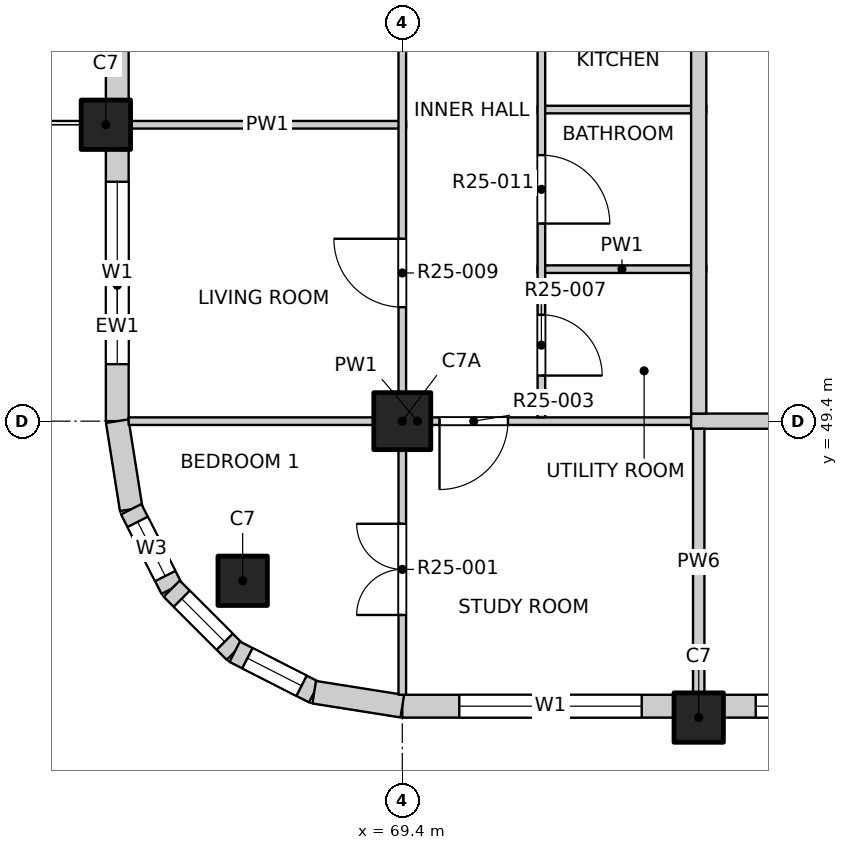
"""IFC4 building model, lengths in metres.
Left out: names, types, materials, properties, quantities, classifications, styles, units other than length and angle.
Written with IfcOpenShell. Run it as: python <this file> out.ifc"""

import sys

from ifc_helpers import new_model, si_unit, direction, frame, frame_2d, origin, origin_2d, place, context, subcontext, project, spatial, rectangle, extrude, element, fill, save


model = new_model("IFC4")
c1 = context("Model", 3, precision=1e-05, world=origin(), true_north=direction((0.0, 1.0)))
c2 = subcontext(c1, "Body", "Model", "MODEL_VIEW")
j1 = project(units=[si_unit("LENGTHUNIT", "METRE"), si_unit("PLANEANGLEUNIT", "RADIAN")], contexts=[c1])
p1 = place(None, origin())
s1 = spatial("IfcSite", under=j1, at=p1, CompositionType="ELEMENT")
p2 = place(p1, origin())
s2 = spatial("IfcBuilding", under=s1, at=p2, CompositionType="ELEMENT")
p3 = place(p2, frame((0.0, 0.0, 252.8)))
s3 = spatial("IfcBuildingStorey", under=s2, at=p3, CompositionType="ELEMENT", Elevation=252.8)
for number, where, z_axis, x_axis in (
    (1, (67.3, 47.3, -0.25), (0.0, 0.0, 1.0), (1.0, 0.0, 0.0)),
    (2, (65.5, 53.3, -0.25), (0.0, 0.0, 1.0), (1.0, 0.0, 0.0)),
    (3, (73.3, 45.5, -0.25), (0.0, 0.0, 1.0), (1.0, 0.0, 0.0)),
):
    element("IfcColumn", number, at=place(p3, frame(where, z_axis=z_axis, x_axis=x_axis)), inside=s3, PredefinedType="COLUMN", context=c2, shape_type="SweptSolid", body=[
        extrude(rectangle(XDim=0.65, YDim=0.65, at=origin_2d()), origin(), (0.0, 0.0, 1.0), 3.4),
    ])
p4 = place(p3, frame((69.4, 49.4, -0.25), z_axis=(0.0, 0.0, 1.0), x_axis=(1.0, 0.0, 0.0)))
e4 = element("IfcColumn", 4, at=p4, inside=s3, PredefinedType="COLUMN", context=c2, shape_type="SweptSolid", body=[
    extrude(rectangle(XDim=0.75, YDim=0.75, at=origin_2d()), origin(), (0.0, 0.0, 1.0), 3.4),
])
p5 = place(p3, frame((69.4, 45.65, 0.0), z_axis=(0.0, 0.0, 1.0), x_axis=(1.0, 0.0, 0.0)))
e5 = element("IfcWall", 5, at=p5, inside=s3, PredefinedType="SOLIDWALL", context=c2, shape_type="SweptSolid", body=[
    extrude(rectangle(XDim=3.575, YDim=0.3, at=frame_2d((1.788, 0.0))), origin(), (0.0, 0.0, 1.0), 2.7),
])
p6 = place(p5, frame((0.75, 0.0, 0.9)))
e6 = element("IfcOpeningElement", 6, at=p6, cuts=e5, PredefinedType="OPENING", context=c2, shape_type="SweptSolid", body=[
    extrude(rectangle(XDim=2.4, YDim=1.8, at=frame_2d((1.2, 0.9))), frame((0.0, 0.16, 0.0), z_axis=(0.0, -1.0, 0.0), x_axis=(1.0, 0.0, 0.0)), (0.0, 0.0, 1.0), 0.32),
])
p7 = place(p3, frame((73.625, 45.65, 0.0), z_axis=(0.0, 0.0, 1.0), x_axis=(1.0, 0.0, 0.0)))
e7 = element("IfcWall", 7, at=p7, inside=s3, PredefinedType="SOLIDWALL", context=c2, shape_type="SweptSolid", body=[
    extrude(rectangle(XDim=7.15, YDim=0.3, at=frame_2d((3.575, 0.0))), origin(), (0.0, 0.0, 1.0), 2.7),
])
p8 = place(p7, frame((0.425, 0.0, 0.9)))
e8 = element("IfcOpeningElement", 8, at=p8, cuts=e7, PredefinedType="OPENING", context=c2, shape_type="SweptSolid", body=[
    extrude(rectangle(XDim=2.4, YDim=1.8, at=frame_2d((1.2, 0.9))), frame((0.0, 0.16, 0.0), z_axis=(0.0, -1.0, 0.0), x_axis=(1.0, 0.0, 0.0)), (0.0, 0.0, 1.0), 0.32),
])
p9 = place(p7, frame((4.325, 0.0, 0.9)))
e9 = element("IfcOpeningElement", 9, at=p9, cuts=e7, PredefinedType="OPENING", context=c2, shape_type="SweptSolid", body=[
    extrude(rectangle(XDim=2.4, YDim=1.8, at=frame_2d((1.2, 0.9))), frame((0.0, 0.16, 0.0), z_axis=(0.0, -1.0, 0.0), x_axis=(1.0, 0.0, 0.0)), (0.0, 0.0, 1.0), 0.32),
])
p10 = place(p3, frame((65.65, 49.4, 0.0), z_axis=(0.0, 0.0, 1.0), x_axis=(0.0, 1.0, 0.0)))
e10 = element("IfcWall", 10, at=p10, inside=s3, PredefinedType="SOLIDWALL", context=c2, shape_type="SweptSolid", body=[
    extrude(rectangle(XDim=3.575, YDim=0.3, at=frame_2d((1.788, 0.0))), origin(), (0.0, 0.0, 1.0), 2.7),
])
p11 = place(p10, frame((0.75, 0.0, 0.9)))
e11 = element("IfcOpeningElement", 11, at=p11, cuts=e10, PredefinedType="OPENING", context=c2, shape_type="SweptSolid", body=[
    extrude(rectangle(XDim=2.4, YDim=1.8, at=frame_2d((1.2, 0.9))), frame((0.0, 0.16, 0.0), z_axis=(0.0, -1.0, 0.0), x_axis=(1.0, 0.0, 0.0)), (0.0, 0.0, 1.0), 0.32),
])
p12 = place(p3, frame((65.65, 53.625, 0.0), z_axis=(0.0, 0.0, 1.0), x_axis=(0.0, 1.0, 0.0)))
e12 = element("IfcWall", 12, at=p12, inside=s3, PredefinedType="SOLIDWALL", context=c2, shape_type="SweptSolid", body=[
    extrude(rectangle(XDim=7.15, YDim=0.3, at=frame_2d((3.575, 0.0))), origin(), (0.0, 0.0, 1.0), 2.7),
])
p13 = place(p12, frame((0.725, 0.0, 0.0)))
e13 = element("IfcOpeningElement", 13, at=p13, cuts=e12, PredefinedType="OPENING", context=c2, shape_type="SweptSolid", body=[
    extrude(rectangle(XDim=1.8, YDim=2.4, at=frame_2d((0.9, 1.2))), frame((0.0, 0.16, 0.0), z_axis=(0.0, -1.0, 0.0), x_axis=(1.0, 0.0, 0.0)), (0.0, 0.0, 1.0), 0.32),
])
p14 = place(p12, frame((4.325, 0.0, 0.9)))
e14 = element("IfcOpeningElement", 14, at=p14, cuts=e12, PredefinedType="OPENING", context=c2, shape_type="SweptSolid", body=[
    extrude(rectangle(XDim=2.4, YDim=1.8, at=frame_2d((1.2, 0.9))), frame((0.0, 0.16, 0.0), z_axis=(0.0, -1.0, 0.0), x_axis=(1.0, 0.0, 0.0)), (0.0, 0.0, 1.0), 0.32),
])
p15 = place(p3, frame((65.65, 49.4, 0.0), z_axis=(0.0, 0.0, 1.0), x_axis=(0.156496880861, -0.987678452879, 0.0)))
e15 = element("IfcWall", 15, at=p15, inside=s3, PredefinedType="SOLIDWALL", context=c2, shape_type="SweptSolid", body=[
    extrude(rectangle(XDim=1.173, YDim=0.3, at=frame_2d((0.586, 0.0))), origin(), (0.0, 0.0, 1.0), 2.7),
])
p16 = place(p3, frame((65.833, 48.241, 0.0), z_axis=(0.0, 0.0, 1.0), x_axis=(0.454025524128, -0.890988677504, 0.0)))
e16 = element("IfcWall", 16, at=p16, inside=s3, PredefinedType="SOLIDWALL", context=c2, shape_type="SweptSolid", body=[
    extrude(rectangle(XDim=1.173, YDim=0.3, at=frame_2d((0.587, 0.0))), origin(), (0.0, 0.0, 1.0), 2.7),
])
p17 = place(p16, frame((0.187, 0.0, 0.9)))
e17 = element("IfcOpeningElement", 17, at=p17, cuts=e16, PredefinedType="OPENING", context=c2, shape_type="SweptSolid", body=[
    extrude(rectangle(XDim=0.8, YDim=1.2, at=frame_2d((0.4, 0.6))), frame((0.0, 0.16, 0.0), z_axis=(0.0, -1.0, 0.0), x_axis=(1.0, 0.0, 0.0)), (0.0, 0.0, 1.0), 0.32),
])
p18 = place(p3, frame((66.366, 47.196, 0.0), z_axis=(0.0, 0.0, 1.0), x_axis=(0.707106781187, -0.707106781187, 0.0)))
e18 = element("IfcWall", 18, at=p18, inside=s3, PredefinedType="SOLIDWALL", context=c2, shape_type="SweptSolid", body=[
    extrude(rectangle(XDim=1.173, YDim=0.3, at=frame_2d((0.586, 0.0))), origin(), (0.0, 0.0, 1.0), 2.7),
])
p19 = place(p18, frame((0.187, 0.0, 0.9)))
e19 = element("IfcOpeningElement", 19, at=p19, cuts=e18, PredefinedType="OPENING", context=c2, shape_type="SweptSolid", body=[
    extrude(rectangle(XDim=0.8, YDim=1.2, at=frame_2d((0.4, 0.6))), frame((0.0, 0.16, 0.0), z_axis=(0.0, -1.0, 0.0), x_axis=(1.0, 0.0, 0.0)), (0.0, 0.0, 1.0), 0.32),
])
p20 = place(p3, frame((67.196, 46.366, 0.0), z_axis=(0.0, 0.0, 1.0), x_axis=(0.890988677504, -0.454025524128, 0.0)))
e20 = element("IfcWall", 20, at=p20, inside=s3, PredefinedType="SOLIDWALL", context=c2, shape_type="SweptSolid", body=[
    extrude(rectangle(XDim=1.173, YDim=0.3, at=frame_2d((0.587, 0.0))), origin(), (0.0, 0.0, 1.0), 2.7),
])
p21 = place(p20, frame((0.187, 0.0, 0.9)))
e21 = element("IfcOpeningElement", 21, at=p21, cuts=e20, PredefinedType="OPENING", context=c2, shape_type="SweptSolid", body=[
    extrude(rectangle(XDim=0.8, YDim=1.2, at=frame_2d((0.4, 0.6))), frame((0.0, 0.16, 0.0), z_axis=(0.0, -1.0, 0.0), x_axis=(1.0, 0.0, 0.0)), (0.0, 0.0, 1.0), 0.32),
])
p22 = place(p3, frame((68.241, 45.833, 0.0), z_axis=(0.0, 0.0, 1.0), x_axis=(0.987678452879, -0.156496880861, 0.0)))
e22 = element("IfcWall", 22, at=p22, inside=s3, PredefinedType="SOLIDWALL", context=c2, shape_type="SweptSolid", body=[
    extrude(rectangle(XDim=1.173, YDim=0.3, at=frame_2d((0.586, 0.0))), origin(), (0.0, 0.0, 1.0), 2.7),
])
p23 = place(p3, frame((65.8, 49.4, 0.0), z_axis=(0.0, 0.0, 1.0), x_axis=(1.0, 0.0, 0.0)))
e23 = element("IfcWall", 23, at=p23, inside=s3, PredefinedType="PARTITIONING", context=c2, shape_type="SweptSolid", body=[
    extrude(rectangle(XDim=7.6, YDim=0.1, at=frame_2d((3.8, 0.0))), origin(), (0.0, 0.0, 1.0), 3.15),
])
p24 = place(p23, frame((4.09, 0.0, 0.0)))
e24 = element("IfcOpeningElement", 24, at=p24, cuts=e23, PredefinedType="OPENING", context=c2, shape_type="SweptSolid", body=[
    extrude(rectangle(XDim=0.9, YDim=2.1, at=frame_2d((0.45, 1.05))), frame((0.0, 0.06, 0.0), z_axis=(0.0, -1.0, 0.0), x_axis=(1.0, 0.0, 0.0)), (0.0, 0.0, 1.0), 0.12),
])
p25 = place(p3, frame((73.2, 49.4, 0.0), z_axis=(0.0, 0.0, 1.0), x_axis=(1.0, 0.0, 0.0)))
e25 = element("IfcWall", 25, at=p25, inside=s3, PredefinedType="PARTITIONING", context=c2, shape_type="SweptSolid", body=[
    extrude(rectangle(XDim=23.6, YDim=0.2, at=frame_2d((11.8, 0.0))), origin(), (0.0, 0.0, 1.0), 3.15),
])
p26 = place(p25, frame((2.325, 0.0, 0.0)))
e26 = element("IfcOpeningElement", 26, at=p26, cuts=e25, PredefinedType="OPENING", context=c2, shape_type="SweptSolid", body=[
    extrude(rectangle(XDim=1.2, YDim=2.1, at=frame_2d((0.6, 1.05))), frame((0.0, 0.11, 0.0), z_axis=(0.0, -1.0, 0.0), x_axis=(1.0, 0.0, 0.0)), (0.0, 0.0, 1.0), 0.22),
])
p27 = place(p25, frame((15.1, 0.0, 0.0)))
e27 = element("IfcOpeningElement", 27, at=p27, cuts=e25, PredefinedType="OPENING", context=c2, shape_type="SweptSolid", body=[
    extrude(rectangle(XDim=1.2, YDim=2.1, at=frame_2d((0.6, 1.05))), frame((0.0, 0.11, 0.0), z_axis=(0.0, -1.0, 0.0), x_axis=(1.0, 0.0, 0.0)), (0.0, 0.0, 1.0), 0.22),
])
p28 = place(p3, frame((71.18, 51.4, 0.0), z_axis=(0.0, 0.0, 1.0), x_axis=(1.0, 0.0, 0.0)))
e28 = element("IfcWall", 28, at=p28, inside=s3, PredefinedType="PARTITIONING", context=c2, shape_type="SweptSolid", body=[
    extrude(rectangle(XDim=2.22, YDim=0.1, at=frame_2d((1.11, 0.0))), origin(), (0.0, 0.0, 1.0), 3.15),
])
p29 = place(p3, frame((65.8, 53.3, 0.0), z_axis=(0.0, 0.0, 1.0), x_axis=(1.0, 0.0, 0.0)))
e29 = element("IfcWall", 29, at=p29, inside=s3, PredefinedType="PARTITIONING", context=c2, shape_type="SweptSolid", body=[
    extrude(rectangle(XDim=3.65, YDim=0.1, at=frame_2d((1.825, 0.0))), origin(), (0.0, 0.0, 1.0), 3.15),
])
p30 = place(p3, frame((71.18, 53.5, 0.0), z_axis=(0.0, 0.0, 1.0), x_axis=(1.0, 0.0, 0.0)))
e30 = element("IfcWall", 30, at=p30, inside=s3, PredefinedType="PARTITIONING", context=c2, shape_type="SweptSolid", body=[
    extrude(rectangle(XDim=2.22, YDim=0.1, at=frame_2d((1.11, 0.0))), origin(), (0.0, 0.0, 1.0), 3.15),
])
p31 = place(p3, frame((69.4, 45.8, 0.0), z_axis=(0.0, 0.0, 1.0), x_axis=(0.0, 1.0, 0.0)))
e31 = element("IfcWall", 31, at=p31, inside=s3, PredefinedType="PARTITIONING", context=c2, shape_type="SweptSolid", body=[
    extrude(rectangle(XDim=38.4, YDim=0.1, at=frame_2d((19.2, 0.0))), origin(), (0.0, 0.0, 1.0), 3.15),
])
p32 = place(p31, frame((1.05, 0.0, 0.0)))
e32 = element("IfcOpeningElement", 32, at=p32, cuts=e31, PredefinedType="OPENING", context=c2, shape_type="SweptSolid", body=[
    extrude(rectangle(XDim=1.2, YDim=2.1, at=frame_2d((0.6, 1.05))), frame((0.0, 0.06, 0.0), z_axis=(0.0, -1.0, 0.0), x_axis=(1.0, 0.0, 0.0)), (0.0, 0.0, 1.0), 0.12),
])
p33 = place(p31, frame((5.1, 0.0, 0.0)))
e33 = element("IfcOpeningElement", 33, at=p33, cuts=e31, PredefinedType="OPENING", context=c2, shape_type="SweptSolid", body=[
    extrude(rectangle(XDim=0.9, YDim=2.1, at=frame_2d((0.45, 1.05))), frame((0.0, 0.06, 0.0), z_axis=(0.0, -1.0, 0.0), x_axis=(1.0, 0.0, 0.0)), (0.0, 0.0, 1.0), 0.12),
])
p34 = place(p31, frame((9.0, 0.0, 0.0)))
e34 = element("IfcOpeningElement", 34, at=p34, cuts=e31, PredefinedType="OPENING", context=c2, shape_type="SweptSolid", body=[
    extrude(rectangle(XDim=0.9, YDim=2.1, at=frame_2d((0.45, 1.05))), frame((0.0, 0.06, 0.0), z_axis=(0.0, -1.0, 0.0), x_axis=(1.0, 0.0, 0.0)), (0.0, 0.0, 1.0), 0.12),
])
p35 = place(p31, frame((12.9, 0.0, 0.0)))
e35 = element("IfcOpeningElement", 35, at=p35, cuts=e31, PredefinedType="OPENING", context=c2, shape_type="SweptSolid", body=[
    extrude(rectangle(XDim=0.9, YDim=2.1, at=frame_2d((0.45, 1.05))), frame((0.0, 0.06, 0.0), z_axis=(0.0, -1.0, 0.0), x_axis=(1.0, 0.0, 0.0)), (0.0, 0.0, 1.0), 0.12),
])
p36 = place(p31, frame((16.8, 0.0, 0.0)))
e36 = element("IfcOpeningElement", 36, at=p36, cuts=e31, PredefinedType="OPENING", context=c2, shape_type="SweptSolid", body=[
    extrude(rectangle(XDim=0.9, YDim=2.1, at=frame_2d((0.45, 1.05))), frame((0.0, 0.06, 0.0), z_axis=(0.0, -1.0, 0.0), x_axis=(1.0, 0.0, 0.0)), (0.0, 0.0, 1.0), 0.12),
])
p37 = place(p31, frame((20.7, 0.0, 0.0)))
e37 = element("IfcOpeningElement", 37, at=p37, cuts=e31, PredefinedType="OPENING", context=c2, shape_type="SweptSolid", body=[
    extrude(rectangle(XDim=0.9, YDim=2.1, at=frame_2d((0.45, 1.05))), frame((0.0, 0.06, 0.0), z_axis=(0.0, -1.0, 0.0), x_axis=(1.0, 0.0, 0.0)), (0.0, 0.0, 1.0), 0.12),
])
p38 = place(p31, frame((24.6, 0.0, 0.0)))
e38 = element("IfcOpeningElement", 38, at=p38, cuts=e31, PredefinedType="OPENING", context=c2, shape_type="SweptSolid", body=[
    extrude(rectangle(XDim=0.9, YDim=2.1, at=frame_2d((0.45, 1.05))), frame((0.0, 0.06, 0.0), z_axis=(0.0, -1.0, 0.0), x_axis=(1.0, 0.0, 0.0)), (0.0, 0.0, 1.0), 0.12),
])
p39 = place(p31, frame((28.5, 0.0, 0.0)))
e39 = element("IfcOpeningElement", 39, at=p39, cuts=e31, PredefinedType="OPENING", context=c2, shape_type="SweptSolid", body=[
    extrude(rectangle(XDim=0.9, YDim=2.1, at=frame_2d((0.45, 1.05))), frame((0.0, 0.06, 0.0), z_axis=(0.0, -1.0, 0.0), x_axis=(1.0, 0.0, 0.0)), (0.0, 0.0, 1.0), 0.12),
])
p40 = place(p31, frame((32.4, 0.0, 0.0)))
e40 = element("IfcOpeningElement", 40, at=p40, cuts=e31, PredefinedType="OPENING", context=c2, shape_type="SweptSolid", body=[
    extrude(rectangle(XDim=0.9, YDim=2.1, at=frame_2d((0.45, 1.05))), frame((0.0, 0.06, 0.0), z_axis=(0.0, -1.0, 0.0), x_axis=(1.0, 0.0, 0.0)), (0.0, 0.0, 1.0), 0.12),
])
p41 = place(p31, frame((36.15, 0.0, 0.0)))
e41 = element("IfcOpeningElement", 41, at=p41, cuts=e31, PredefinedType="OPENING", context=c2, shape_type="SweptSolid", body=[
    extrude(rectangle(XDim=1.2, YDim=2.1, at=frame_2d((0.6, 1.05))), frame((0.0, 0.06, 0.0), z_axis=(0.0, -1.0, 0.0), x_axis=(1.0, 0.0, 0.0)), (0.0, 0.0, 1.0), 0.12),
])
p42 = place(p3, frame((71.23, 49.45, 0.0), z_axis=(0.0, 0.0, 1.0), x_axis=(0.0, 1.0, 0.0)))
e42 = element("IfcWall", 42, at=p42, inside=s3, PredefinedType="PARTITIONING", context=c2, shape_type="SweptSolid", body=[
    extrude(rectangle(XDim=8.9, YDim=0.1, at=frame_2d((4.45, 0.0))), origin(), (0.0, 0.0, 1.0), 3.15),
])
p43 = place(p42, frame((0.55, 0.0, 0.0)))
e43 = element("IfcOpeningElement", 43, at=p43, cuts=e42, PredefinedType="OPENING", context=c2, shape_type="SweptSolid", body=[
    extrude(rectangle(XDim=0.8, YDim=2.1, at=frame_2d((0.4, 1.05))), frame((0.0, 0.06, 0.0), z_axis=(0.0, -1.0, 0.0), x_axis=(1.0, 0.0, 0.0)), (0.0, 0.0, 1.0), 0.12),
])
p44 = place(p42, frame((2.55, 0.0, 0.0)))
e44 = element("IfcOpeningElement", 44, at=p44, cuts=e42, PredefinedType="OPENING", context=c2, shape_type="SweptSolid", body=[
    extrude(rectangle(XDim=0.9, YDim=2.1, at=frame_2d((0.45, 1.05))), frame((0.0, 0.06, 0.0), z_axis=(0.0, -1.0, 0.0), x_axis=(1.0, 0.0, 0.0)), (0.0, 0.0, 1.0), 0.12),
])
p45 = place(p42, frame((4.91, 0.0, 0.0)))
e45 = element("IfcOpeningElement", 45, at=p45, cuts=e42, PredefinedType="OPENING", context=c2, shape_type="SweptSolid", body=[
    extrude(rectangle(XDim=0.9, YDim=2.1, at=frame_2d((0.45, 1.05))), frame((0.0, 0.06, 0.0), z_axis=(0.0, -1.0, 0.0), x_axis=(1.0, 0.0, 0.0)), (0.0, 0.0, 1.0), 0.12),
])
p46 = place(p42, frame((7.41, 0.0, 0.0)))
e46 = element("IfcOpeningElement", 46, at=p46, cuts=e42, PredefinedType="OPENING", context=c2, shape_type="SweptSolid", body=[
    extrude(rectangle(XDim=0.8, YDim=2.1, at=frame_2d((0.4, 1.05))), frame((0.0, 0.06, 0.0), z_axis=(0.0, -1.0, 0.0), x_axis=(1.0, 0.0, 0.0)), (0.0, 0.0, 1.0), 0.12),
])
p47 = place(p3, frame((73.3, 45.8, 0.0), z_axis=(0.0, 0.0, 1.0), x_axis=(0.0, 1.0, 0.0)))
e47 = element("IfcWall", 47, at=p47, inside=s3, PredefinedType="PARTITIONING", context=c2, shape_type="SweptSolid", body=[
    extrude(rectangle(XDim=3.5, YDim=0.15, at=frame_2d((1.75, 0.0))), origin(), (0.0, 0.0, 1.0), 3.15),
])
p48 = place(p3, frame((73.3, 49.5, 0.0), z_axis=(0.0, 0.0, 1.0), x_axis=(0.0, 1.0, 0.0)))
e48 = element("IfcWall", 48, at=p48, inside=s3, PredefinedType="PARTITIONING", context=c2, shape_type="SweptSolid", body=[
    extrude(rectangle(XDim=34.7, YDim=0.2, at=frame_2d((17.35, 0.0))), origin(), (0.0, 0.0, 1.0), 3.15),
])
p49 = place(p48, frame((10.175, 0.0, 0.0)))
e49 = element("IfcOpeningElement", 49, at=p49, cuts=e48, PredefinedType="OPENING", context=c2, shape_type="SweptSolid", body=[
    extrude(rectangle(XDim=1.0, YDim=2.1, at=frame_2d((0.5, 1.05))), frame((0.0, 0.11, 0.0), z_axis=(0.0, -1.0, 0.0), x_axis=(1.0, 0.0, 0.0)), (0.0, 0.0, 1.0), 0.22),
])
p50 = place(p48, frame((21.475, 0.0, 0.0)))
e50 = element("IfcOpeningElement", 50, at=p50, cuts=e48, PredefinedType="OPENING", context=c2, shape_type="SweptSolid", body=[
    extrude(rectangle(XDim=1.0, YDim=2.1, at=frame_2d((0.5, 1.05))), frame((0.0, 0.11, 0.0), z_axis=(0.0, -1.0, 0.0), x_axis=(1.0, 0.0, 0.0)), (0.0, 0.0, 1.0), 0.22),
])
p51 = place(p48, frame((29.875, 0.0, 0.0)))
e51 = element("IfcOpeningElement", 51, at=p51, cuts=e48, PredefinedType="OPENING", context=c2, shape_type="SweptSolid", body=[
    extrude(rectangle(XDim=1.0, YDim=2.1, at=frame_2d((0.5, 1.05))), frame((0.0, 0.11, 0.0), z_axis=(0.0, -1.0, 0.0), x_axis=(1.0, 0.0, 0.0)), (0.0, 0.0, 1.0), 0.22),
])
p52 = place(p6, origin())
e52 = element("IfcWindow", 52, at=p52, inside=s3, PartitioningType="DOUBLE_PANEL_VERTICAL", PredefinedType="WINDOW", context=c2, shape_type="SweptSolid", body=[
    extrude(rectangle(XDim=2.4, YDim=1.8, at=frame_2d((1.2, 0.9))), frame((0.0, 0.03, 0.0), z_axis=(0.0, -1.0, 0.0), x_axis=(1.0, 0.0, 0.0)), (0.0, 0.0, 1.0), 0.06),
])
fill(e6, e52)
p53 = place(p8, origin())
e53 = element("IfcWindow", 53, at=p53, inside=s3, PartitioningType="DOUBLE_PANEL_VERTICAL", PredefinedType="WINDOW", context=c2, shape_type="SweptSolid", body=[
    extrude(rectangle(XDim=2.4, YDim=1.8, at=frame_2d((1.2, 0.9))), frame((0.0, 0.03, 0.0), z_axis=(0.0, -1.0, 0.0), x_axis=(1.0, 0.0, 0.0)), (0.0, 0.0, 1.0), 0.06),
])
fill(e8, e53)
p54 = place(p11, origin())
e54 = element("IfcWindow", 54, at=p54, inside=s3, PartitioningType="DOUBLE_PANEL_VERTICAL", PredefinedType="WINDOW", context=c2, shape_type="SweptSolid", body=[
    extrude(rectangle(XDim=2.4, YDim=1.8, at=frame_2d((1.2, 0.9))), frame((0.0, 0.03, 0.0), z_axis=(0.0, -1.0, 0.0), x_axis=(1.0, 0.0, 0.0)), (0.0, 0.0, 1.0), 0.06),
])
fill(e11, e54)
p55 = place(p17, origin())
e55 = element("IfcWindow", 55, at=p55, inside=s3, PartitioningType="SINGLE_PANEL", PredefinedType="WINDOW", context=c2, shape_type="SweptSolid", body=[
    extrude(rectangle(XDim=0.8, YDim=1.2, at=frame_2d((0.4, 0.6))), frame((0.0, 0.03, 0.0), z_axis=(0.0, -1.0, 0.0), x_axis=(1.0, 0.0, 0.0)), (0.0, 0.0, 1.0), 0.06),
])
fill(e17, e55)
p56 = place(p19, origin())
e56 = element("IfcWindow", 56, at=p56, inside=s3, PartitioningType="SINGLE_PANEL", PredefinedType="WINDOW", context=c2, shape_type="SweptSolid", body=[
    extrude(rectangle(XDim=0.8, YDim=1.2, at=frame_2d((0.4, 0.6))), frame((0.0, 0.03, 0.0), z_axis=(0.0, -1.0, 0.0), x_axis=(1.0, 0.0, 0.0)), (0.0, 0.0, 1.0), 0.06),
])
fill(e19, e56)
p57 = place(p21, origin())
e57 = element("IfcWindow", 57, at=p57, inside=s3, PartitioningType="SINGLE_PANEL", PredefinedType="WINDOW", context=c2, shape_type="SweptSolid", body=[
    extrude(rectangle(XDim=0.8, YDim=1.2, at=frame_2d((0.4, 0.6))), frame((0.0, 0.03, 0.0), z_axis=(0.0, -1.0, 0.0), x_axis=(1.0, 0.0, 0.0)), (0.0, 0.0, 1.0), 0.06),
])
fill(e21, e57)
p58 = place(p32, origin())
e58 = element("IfcDoor", 58, at=p58, inside=s3, OperationType="DOUBLE_DOOR_SINGLE_SWING", PredefinedType="DOOR", context=c2, shape_type="SweptSolid", body=[
    extrude(rectangle(XDim=1.2, YDim=2.1, at=frame_2d((0.6, 1.05))), frame((0.0, 0.025, 0.0), z_axis=(0.0, -1.0, 0.0), x_axis=(1.0, 0.0, 0.0)), (0.0, 0.0, 1.0), 0.05),
])
fill(e32, e58)
p59 = place(p24, origin())
e59 = element("IfcDoor", 59, at=p59, inside=s3, OperationType="SINGLE_SWING_RIGHT", PredefinedType="DOOR", context=c2, shape_type="SweptSolid", body=[
    extrude(rectangle(XDim=0.9, YDim=2.1, at=frame_2d((0.45, 1.05))), frame((0.0, 0.025, 0.0), z_axis=(0.0, -1.0, 0.0), x_axis=(1.0, 0.0, 0.0)), (0.0, 0.0, 1.0), 0.05),
])
fill(e24, e59)
p60 = place(p43, origin())
e60 = element("IfcDoor", 60, at=p60, inside=s3, OperationType="SINGLE_SWING_RIGHT", PredefinedType="DOOR", context=c2, shape_type="SweptSolid", body=[
    extrude(rectangle(XDim=0.8, YDim=2.1, at=frame_2d((0.4, 1.05))), frame((0.0, 0.025, 0.0), z_axis=(0.0, -1.0, 0.0), x_axis=(1.0, 0.0, 0.0)), (0.0, 0.0, 1.0), 0.05),
])
fill(e43, e60)
p61 = place(p33, origin())
e61 = element("IfcDoor", 61, at=p61, inside=s3, OperationType="SINGLE_SWING_RIGHT", PredefinedType="DOOR", context=c2, shape_type="SweptSolid", body=[
    extrude(rectangle(XDim=0.9, YDim=2.1, at=frame_2d((0.45, 1.05))), frame((0.0, 0.025, 0.0), z_axis=(0.0, -1.0, 0.0), x_axis=(1.0, 0.0, 0.0)), (0.0, 0.0, 1.0), 0.05),
])
fill(e33, e61)
p62 = place(p44, origin())
e62 = element("IfcDoor", 62, at=p62, inside=s3, OperationType="SINGLE_SWING_RIGHT", PredefinedType="DOOR", context=c2, shape_type="SweptSolid", body=[
    extrude(rectangle(XDim=0.9, YDim=2.1, at=frame_2d((0.45, 1.05))), frame((0.0, 0.025, 0.0), z_axis=(0.0, -1.0, 0.0), x_axis=(1.0, 0.0, 0.0)), (0.0, 0.0, 1.0), 0.05),
])
fill(e44, e62)
save(model, sys.argv[1])
